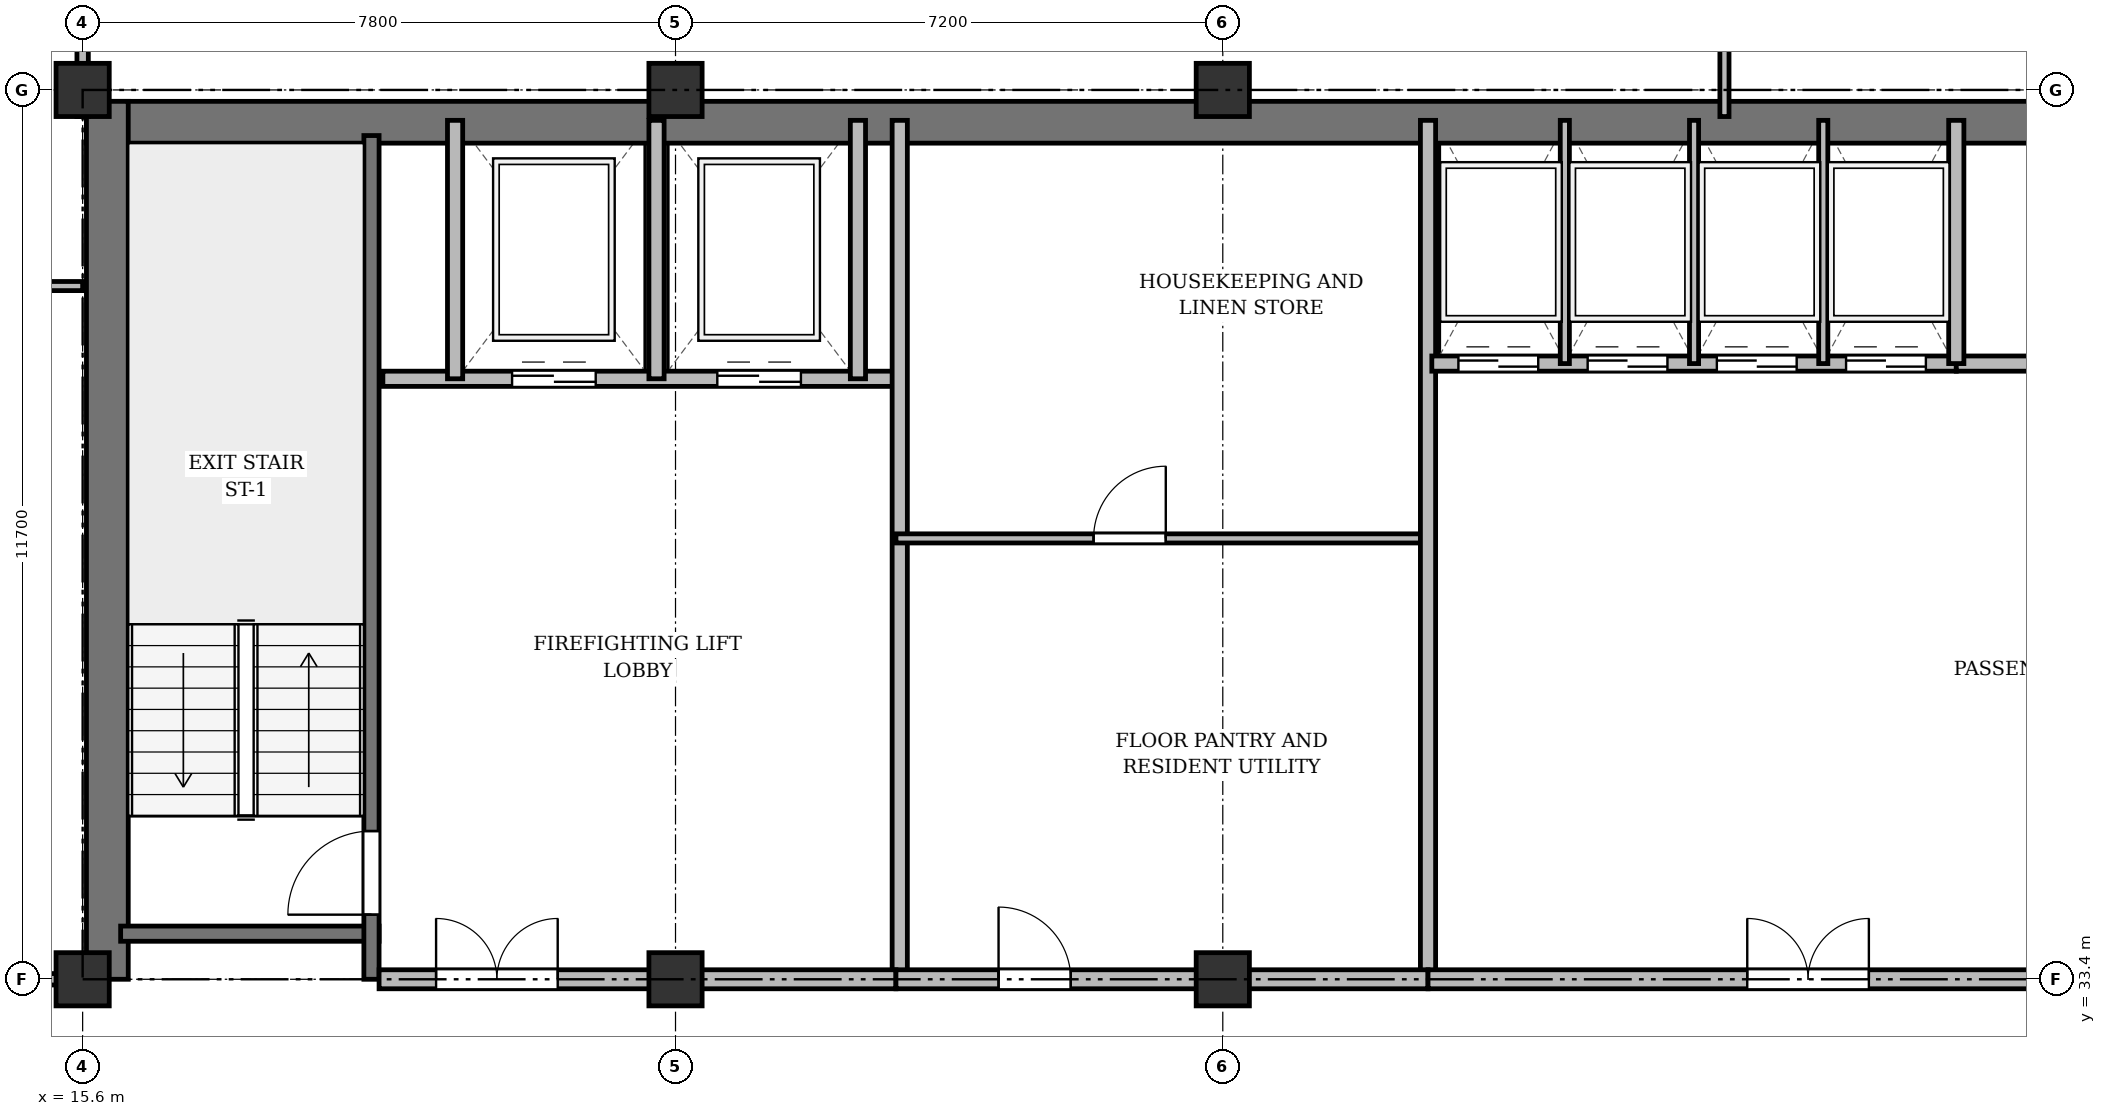
"""IFC4 building model, lengths in metres.
Left out: names, types, materials, properties, quantities, classifications, styles, units other than length and angle.
Written with IfcOpenShell. Run it as: python <this file> out.ifc"""

import sys

from ifc_helpers import new_model, si_unit, direction, frame, frame_2d, origin, origin_2d, place, context, subcontext, project, spatial, rectangle, extrude, source, transform, mapped, element, fill, save


model = new_model("IFC4")
c1 = context("Model", 3, precision=1e-05, world=origin(), true_north=direction((0.0, 1.0)))
c2 = subcontext(c1, "Body", "Model", "MODEL_VIEW")
j1 = project(units=[si_unit("LENGTHUNIT", "METRE"), si_unit("PLANEANGLEUNIT", "RADIAN")], contexts=[c1])
p1 = place(None, origin())
s1 = spatial("IfcSite", under=j1, at=p1, CompositionType="ELEMENT")
p2 = place(p1, origin())
s2 = spatial("IfcBuilding", under=s1, at=p2, CompositionType="ELEMENT")
p3 = place(p2, frame((0.0, 0.0, 175.3)))
s3 = spatial("IfcBuildingStorey", under=s2, at=p3, CompositionType="ELEMENT", Elevation=175.3)
m1 = source(origin(), c2, "Body", "SweptSolid", [
    extrude(rectangle(XDim=0.7, YDim=0.7, at=origin_2d()), origin(), (0.0, 0.0, 1.0), 3.6),
])
for number, where, z_axis, x_axis in (
    (1, (15.6, 33.4, 0.0), (0.0, 0.0, 1.0), (1.0, 0.0, 0.0)),
    (2, (15.6, 45.1, 0.0), (0.0, 0.0, 1.0), (1.0, 0.0, 0.0)),
    (3, (23.4, 33.4, 0.0), (0.0, 0.0, 1.0), (1.0, 0.0, 0.0)),
    (4, (23.4, 45.1, 0.0), (0.0, 0.0, 1.0), (1.0, 0.0, 0.0)),
    (5, (30.6, 33.4, 0.0), (0.0, 0.0, 1.0), (1.0, 0.0, 0.0)),
    (6, (30.6, 45.1, 0.0), (0.0, 0.0, 1.0), (1.0, 0.0, 0.0)),
):
    element("IfcColumn", number, at=place(p3, frame(where, z_axis=z_axis, x_axis=x_axis)), inside=s3, PredefinedType="COLUMN", context=c2, shape_type="MappedRepresentation", body=[
        mapped(m1, transform((0.0, 0.0, 0.0), x_axis=(1.0, 0.0, 0.0), y_axis=(0.0, 1.0, 0.0), z_axis=(0.0, 0.0, 1.0), scale=1.0)),
    ])
p4 = place(p3, frame((15.65, 44.675, 0.0), z_axis=(0.0, 0.0, 1.0), x_axis=(1.0, 0.0, 0.0)))
e7 = element("IfcWall", 7, at=p4, inside=s3, PredefinedType="SHEAR", context=c2, shape_type="SweptSolid", body=[
    extrude(rectangle(XDim=43.1, YDim=0.55, at=frame_2d((21.55, 0.0))), origin(), (0.0, 0.0, 1.0), 3.35),
])
p5 = place(p3, frame((15.925, 33.4, 0.0), z_axis=(0.0, 0.0, 1.0), x_axis=(0.0, 1.0, 0.0)))
e8 = element("IfcWall", 8, at=p5, inside=s3, PredefinedType="SHEAR", context=c2, shape_type="SweptSolid", body=[
    extrude(rectangle(XDim=11.55, YDim=0.55, at=frame_2d((5.775, 0.0))), origin(), (0.0, 0.0, 1.0), 3.35),
])
p6 = place(p3, frame((16.1, 34.0, 0.0), z_axis=(0.0, 0.0, 1.0), x_axis=(1.0, 0.0, 0.0)))
e9 = element("IfcWall", 9, at=p6, inside=s3, PredefinedType="SHEAR", context=c2, shape_type="SweptSolid", body=[
    extrude(rectangle(XDim=3.4, YDim=0.2, at=frame_2d((1.7, 0.0))), origin(), (0.0, 0.0, 1.0), 3.35),
])
p7 = place(p3, frame((19.4, 33.4, 0.0), z_axis=(0.0, 0.0, 1.0), x_axis=(0.0, 1.0, 0.0)))
e10 = element("IfcWall", 10, at=p7, inside=s3, PredefinedType="SHEAR", context=c2, shape_type="SweptSolid", body=[
    extrude(rectangle(XDim=11.1, YDim=0.2, at=frame_2d((5.55, 0.0))), origin(), (0.0, 0.0, 1.0), 3.35),
])
p8 = place(p7, frame((0.85, 0.0, 0.0)))
e11 = element("IfcOpeningElement", 11, at=p8, cuts=e10, PredefinedType="OPENING", context=c2, shape_type="SweptSolid", body=[
    extrude(rectangle(XDim=1.1, YDim=2.15, at=frame_2d((0.55, 1.075))), frame((0.0, 0.11, 0.0), z_axis=(0.0, -1.0, 0.0), x_axis=(1.0, 0.0, 0.0)), (0.0, 0.0, 1.0), 0.22),
])
p9 = place(p3, frame((19.55, 41.3, 0.0), z_axis=(0.0, 0.0, 1.0), x_axis=(1.0, 0.0, 0.0)))
e12 = element("IfcWall", 12, at=p9, inside=s3, PredefinedType="SOLIDWALL", context=c2, shape_type="SweptSolid", body=[
    extrude(rectangle(XDim=6.75, YDim=0.2, at=frame_2d((3.375, 0.0))), origin(), (0.0, 0.0, 1.0), 3.35),
])
p10 = place(p9, frame((1.7, 0.0, 0.0)))
e13 = element("IfcOpeningElement", 13, at=p10, cuts=e12, PredefinedType="OPENING", context=c2, shape_type="SweptSolid", body=[
    extrude(rectangle(XDim=1.1, YDim=2.15, at=frame_2d((0.55, 1.075))), frame((0.0, 0.11, 0.0), z_axis=(0.0, -1.0, 0.0), x_axis=(1.0, 0.0, 0.0)), (0.0, 0.0, 1.0), 0.22),
])
p11 = place(p9, frame((4.4, 0.0, 0.0)))
e14 = element("IfcOpeningElement", 14, at=p11, cuts=e12, PredefinedType="OPENING", context=c2, shape_type="SweptSolid", body=[
    extrude(rectangle(XDim=1.1, YDim=2.15, at=frame_2d((0.55, 1.075))), frame((0.0, 0.11, 0.0), z_axis=(0.0, -1.0, 0.0), x_axis=(1.0, 0.0, 0.0)), (0.0, 0.0, 1.0), 0.22),
])
for number, where, z_axis, x_axis in (
    (15, (20.5, 41.3, 0.0), (0.0, 0.0, 1.0), (0.0, 1.0, 0.0)),
    (16, (23.15, 41.3, 0.0), (0.0, 0.0, 1.0), (0.0, 1.0, 0.0)),
    (17, (25.8, 41.3, 0.0), (0.0, 0.0, 1.0), (0.0, 1.0, 0.0)),
):
    element("IfcWall", number, at=place(p3, frame(where, z_axis=z_axis, x_axis=x_axis)), inside=s3, PredefinedType="SOLIDWALL", context=c2, shape_type="SweptSolid", body=[
        extrude(rectangle(XDim=3.4, YDim=0.2, at=frame_2d((1.7, 0.0))), origin(), (0.0, 0.0, 1.0), 3.35),
    ])
p12 = place(p3, frame((26.35, 33.4, 0.0), z_axis=(0.0, 0.0, 1.0), x_axis=(0.0, 1.0, 0.0)))
e18 = element("IfcWall", 18, at=p12, inside=s3, PredefinedType="SOLIDWALL", context=c2, shape_type="SweptSolid", body=[
    extrude(rectangle(XDim=11.3, YDim=0.2, at=frame_2d((5.65, 0.0))), origin(), (0.0, 0.0, 1.0), 2.75),
])
p13 = place(p3, frame((19.5, 33.4, 0.0), z_axis=(0.0, 0.0, 1.0), x_axis=(1.0, 0.0, 0.0)))
e19 = element("IfcWall", 19, at=p13, inside=s3, PredefinedType="PARTITIONING", context=c2, shape_type="SweptSolid", body=[
    extrude(rectangle(XDim=6.8, YDim=0.25, at=frame_2d((3.4, 0.0))), origin(), (0.0, 0.0, 1.0), 2.75),
])
p14 = place(p13, frame((0.75, 0.0, 0.0)))
e20 = element("IfcOpeningElement", 20, at=p14, cuts=e19, PredefinedType="OPENING", context=c2, shape_type="SweptSolid", body=[
    extrude(rectangle(XDim=1.6, YDim=2.2, at=frame_2d((0.8, 1.1))), frame((0.0, 0.135, 0.0), z_axis=(0.0, -1.0, 0.0), x_axis=(1.0, 0.0, 0.0)), (0.0, 0.0, 1.0), 0.27),
])
p15 = place(p3, frame((26.3, 39.2, 0.0), z_axis=(0.0, 0.0, 1.0), x_axis=(1.0, 0.0, 0.0)))
e21 = element("IfcWall", 21, at=p15, inside=s3, PredefinedType="PARTITIONING", context=c2, shape_type="SweptSolid", body=[
    extrude(rectangle(XDim=7.0, YDim=0.12, at=frame_2d((3.5, 0.0))), origin(), (0.0, 0.0, 1.0), 2.85),
])
p16 = place(p15, frame((2.6, 0.0, 0.0)))
e22 = element("IfcOpeningElement", 22, at=p16, cuts=e21, PredefinedType="OPENING", context=c2, shape_type="SweptSolid", body=[
    extrude(rectangle(XDim=0.95, YDim=2.15, at=frame_2d((0.475, 1.075))), frame((0.0, 0.07, 0.0), z_axis=(0.0, -1.0, 0.0), x_axis=(1.0, 0.0, 0.0)), (0.0, 0.0, 1.0), 0.14),
])
p17 = place(p3, frame((33.3, 33.4, 0.0), z_axis=(0.0, 0.0, 1.0), x_axis=(0.0, 1.0, 0.0)))
e23 = element("IfcWall", 23, at=p17, inside=s3, PredefinedType="SOLIDWALL", context=c2, shape_type="SweptSolid", body=[
    extrude(rectangle(XDim=11.3, YDim=0.2, at=frame_2d((5.65, 0.0))), origin(), (0.0, 0.0, 1.0), 2.75),
])
p18 = place(p3, frame((33.35, 41.5, 0.0), z_axis=(0.0, 0.0, 1.0), x_axis=(1.0, 0.0, 0.0)))
e24 = element("IfcWall", 24, at=p18, inside=s3, PredefinedType="SOLIDWALL", context=c2, shape_type="SweptSolid", body=[
    extrude(rectangle(XDim=6.9, YDim=0.2, at=frame_2d((3.45, 0.0))), origin(), (0.0, 0.0, 1.0), 3.35),
])
p19 = place(p18, frame((0.35, 0.0, 0.0)))
e25 = element("IfcOpeningElement", 25, at=p19, cuts=e24, PredefinedType="OPENING", context=c2, shape_type="SweptSolid", body=[
    extrude(rectangle(XDim=1.05, YDim=2.15, at=frame_2d((0.525, 1.075))), frame((0.0, 0.11, 0.0), z_axis=(0.0, -1.0, 0.0), x_axis=(1.0, 0.0, 0.0)), (0.0, 0.0, 1.0), 0.22),
])
p20 = place(p18, frame((2.05, 0.0, 0.0)))
e26 = element("IfcOpeningElement", 26, at=p20, cuts=e24, PredefinedType="OPENING", context=c2, shape_type="SweptSolid", body=[
    extrude(rectangle(XDim=1.05, YDim=2.15, at=frame_2d((0.525, 1.075))), frame((0.0, 0.11, 0.0), z_axis=(0.0, -1.0, 0.0), x_axis=(1.0, 0.0, 0.0)), (0.0, 0.0, 1.0), 0.22),
])
p21 = place(p18, frame((3.75, 0.0, 0.0)))
e27 = element("IfcOpeningElement", 27, at=p21, cuts=e24, PredefinedType="OPENING", context=c2, shape_type="SweptSolid", body=[
    extrude(rectangle(XDim=1.05, YDim=2.15, at=frame_2d((0.525, 1.075))), frame((0.0, 0.11, 0.0), z_axis=(0.0, -1.0, 0.0), x_axis=(1.0, 0.0, 0.0)), (0.0, 0.0, 1.0), 0.22),
])
p22 = place(p18, frame((5.45, 0.0, 0.0)))
e28 = element("IfcOpeningElement", 28, at=p22, cuts=e24, PredefinedType="OPENING", context=c2, shape_type="SweptSolid", body=[
    extrude(rectangle(XDim=1.05, YDim=2.15, at=frame_2d((0.525, 1.075))), frame((0.0, 0.11, 0.0), z_axis=(0.0, -1.0, 0.0), x_axis=(1.0, 0.0, 0.0)), (0.0, 0.0, 1.0), 0.22),
])
for number, where, z_axis, x_axis in (
    (29, (35.1, 41.5, 0.0), (0.0, 0.0, 1.0), (0.0, 1.0, 0.0)),
    (30, (36.8, 41.5, 0.0), (0.0, 0.0, 1.0), (0.0, 1.0, 0.0)),
    (31, (38.5, 41.5, 0.0), (0.0, 0.0, 1.0), (0.0, 1.0, 0.0)),
):
    element("IfcWall", number, at=place(p3, frame(where, z_axis=z_axis, x_axis=x_axis)), inside=s3, PredefinedType="PARTITIONING", context=c2, shape_type="SweptSolid", body=[
        extrude(rectangle(XDim=3.2, YDim=0.12, at=frame_2d((1.6, 0.0))), origin(), (0.0, 0.0, 1.0), 3.35),
    ])
p23 = place(p3, frame((40.25, 41.5, 0.0), z_axis=(0.0, 0.0, 1.0), x_axis=(1.0, 0.0, 0.0)))
e32 = element("IfcWall", 32, at=p23, inside=s3, PredefinedType="SOLIDWALL", context=c2, shape_type="SweptSolid", body=[
    extrude(rectangle(XDim=6.9, YDim=0.2, at=frame_2d((3.45, 0.0))), origin(), (0.0, 0.0, 1.0), 2.85),
])
p24 = place(p3, frame((40.25, 41.5, 0.0), z_axis=(0.0, 0.0, 1.0), x_axis=(0.0, 1.0, 0.0)))
e33 = element("IfcWall", 33, at=p24, inside=s3, PredefinedType="SOLIDWALL", context=c2, shape_type="SweptSolid", body=[
    extrude(rectangle(XDim=3.2, YDim=0.2, at=frame_2d((1.6, 0.0))), origin(), (0.0, 0.0, 1.0), 3.35),
])
p25 = place(p3, frame((26.3, 33.4, 0.0), z_axis=(0.0, 0.0, 1.0), x_axis=(1.0, 0.0, 0.0)))
e34 = element("IfcWall", 34, at=p25, inside=s3, PredefinedType="PARTITIONING", context=c2, shape_type="SweptSolid", body=[
    extrude(rectangle(XDim=7.0, YDim=0.25, at=frame_2d((3.5, 0.0))), origin(), (0.0, 0.0, 1.0), 2.75),
])
p26 = place(p25, frame((1.35, 0.0, 0.0)))
e35 = element("IfcOpeningElement", 35, at=p26, cuts=e34, PredefinedType="OPENING", context=c2, shape_type="SweptSolid", body=[
    extrude(rectangle(XDim=0.95, YDim=2.15, at=frame_2d((0.475, 1.075))), frame((0.0, 0.135, 0.0), z_axis=(0.0, -1.0, 0.0), x_axis=(1.0, 0.0, 0.0)), (0.0, 0.0, 1.0), 0.27),
])
p27 = place(p3, frame((33.3, 33.4, 0.0), z_axis=(0.0, 0.0, 1.0), x_axis=(1.0, 0.0, 0.0)))
e36 = element("IfcWall", 36, at=p27, inside=s3, PredefinedType="PARTITIONING", context=c2, shape_type="SweptSolid", body=[
    extrude(rectangle(XDim=13.85, YDim=0.25, at=frame_2d((6.925, 0.0))), origin(), (0.0, 0.0, 1.0), 2.75),
])
p28 = place(p27, frame((4.2, 0.0, 0.0)))
e37 = element("IfcOpeningElement", 37, at=p28, cuts=e36, PredefinedType="OPENING", context=c2, shape_type="SweptSolid", body=[
    extrude(rectangle(XDim=1.6, YDim=2.2, at=frame_2d((0.8, 1.1))), frame((0.0, 0.135, 0.0), z_axis=(0.0, -1.0, 0.0), x_axis=(1.0, 0.0, 0.0)), (0.0, 0.0, 1.0), 0.27),
])
p29 = place(p3, frame((11.825, 42.52, 0.0), z_axis=(0.0, 0.0, 1.0), x_axis=(1.0, 0.0, 0.0)))
e38 = element("IfcWall", 38, at=p29, inside=s3, PredefinedType="PARTITIONING", context=c2, shape_type="SweptSolid", body=[
    extrude(rectangle(XDim=3.775, YDim=0.12, at=frame_2d((1.888, 0.0))), origin(), (0.0, 0.0, 1.0), 2.85),
])
p30 = place(p29, frame((1.319, 0.0, 0.0)))
e39 = element("IfcOpeningElement", 39, at=p30, cuts=e38, PredefinedType="OPENING", context=c2, shape_type="SweptSolid", body=[
    extrude(rectangle(XDim=0.95, YDim=2.15, at=frame_2d((0.475, 1.075))), frame((0.0, 0.07, 0.0), z_axis=(0.0, -1.0, 0.0), x_axis=(1.0, 0.0, 0.0)), (0.0, 0.0, 1.0), 0.14),
])
p31 = place(p3, frame((8.05, 33.4, 0.0), z_axis=(0.0, 0.0, 1.0), x_axis=(1.0, 0.0, 0.0)))
e40 = element("IfcWall", 40, at=p31, inside=s3, PredefinedType="PARTITIONING", context=c2, shape_type="SweptSolid", body=[
    extrude(rectangle(XDim=7.55, YDim=0.15, at=frame_2d((3.775, 0.0))), origin(), (0.0, 0.0, 1.0), 2.75),
])
p32 = place(p31, frame((4.375, 0.0, 0.0)))
e41 = element("IfcOpeningElement", 41, at=p32, cuts=e40, PredefinedType="OPENING", context=c2, shape_type="SweptSolid", body=[
    extrude(rectangle(XDim=0.95, YDim=2.15, at=frame_2d((0.475, 1.075))), frame((0.0, 0.085, 0.0), z_axis=(0.0, -1.0, 0.0), x_axis=(1.0, 0.0, 0.0)), (0.0, 0.0, 1.0), 0.17),
])
p33 = place(p3, frame((37.2, 44.75, 0.0), z_axis=(0.0, 0.0, 1.0), x_axis=(0.0, 1.0, 0.0)))
e42 = element("IfcWall", 42, at=p33, inside=s3, PredefinedType="PARTITIONING", context=c2, shape_type="SweptSolid", body=[
    extrude(rectangle(XDim=3.61, YDim=0.12, at=frame_2d((1.805, 0.0))), origin(), (0.0, 0.0, 1.0), 2.75),
])
p34 = place(p33, frame((1.1, 0.0, 0.0)))
e43 = element("IfcOpeningElement", 43, at=p34, cuts=e42, PredefinedType="OPENING", context=c2, shape_type="SweptSolid", body=[
    extrude(rectangle(XDim=0.95, YDim=2.15, at=frame_2d((0.475, 1.075))), frame((0.0, 0.07, 0.0), z_axis=(0.0, -1.0, 0.0), x_axis=(1.0, 0.0, 0.0)), (0.0, 0.0, 1.0), 0.14),
])
p35 = place(p3, frame((15.6, 44.75, 0.0), z_axis=(0.0, 0.0, 1.0), x_axis=(0.0, 1.0, 0.0)))
e44 = element("IfcWall", 44, at=p35, inside=s3, PredefinedType="PARTITIONING", context=c2, shape_type="SweptSolid", body=[
    extrude(rectangle(XDim=3.61, YDim=0.15, at=frame_2d((1.805, 0.0))), origin(), (0.0, 0.0, 1.0), 2.85),
])
p36 = place(p35, frame((1.1, 0.0, 0.0)))
e45 = element("IfcOpeningElement", 45, at=p36, cuts=e44, PredefinedType="OPENING", context=c2, shape_type="SweptSolid", body=[
    extrude(rectangle(XDim=0.95, YDim=2.15, at=frame_2d((0.475, 1.075))), frame((0.0, 0.085, 0.0), z_axis=(0.0, -1.0, 0.0), x_axis=(1.0, 0.0, 0.0)), (0.0, 0.0, 1.0), 0.17),
])
m2 = source(origin(), c2, "Body", "SweptSolid", [
    extrude(rectangle(XDim=1.1, YDim=2.15, at=frame_2d((0.55, 1.075))), frame((0.0, 0.025, 0.0), z_axis=(0.0, -1.0, 0.0), x_axis=(1.0, 0.0, 0.0)), (0.0, 0.0, 1.0), 0.05),
])
p37 = place(p8, origin())
e46 = element("IfcDoor", 46, at=p37, inside=s3, OperationType="SINGLE_SWING_LEFT", PredefinedType="DOOR", context=c2, shape_type="MappedRepresentation", body=[
    mapped(m2, transform((0.0, 0.0, 0.0), x_axis=(1.0, 0.0, 0.0), y_axis=(0.0, 1.0, 0.0), z_axis=(0.0, 0.0, 1.0), scale=1.0)),
])
fill(e11, e46)
p38 = place(p10, origin())
e47 = element("IfcDoor", 47, at=p38, inside=s3, OperationType="DOUBLE_DOOR_SLIDING", PredefinedType="DOOR", context=c2, shape_type="MappedRepresentation", body=[
    mapped(m2, transform((0.0, 0.0, 0.0), x_axis=(1.0, 0.0, 0.0), y_axis=(0.0, 1.0, 0.0), z_axis=(0.0, 0.0, 1.0), scale=1.0)),
])
fill(e13, e47)
p39 = place(p11, origin())
e48 = element("IfcDoor", 48, at=p39, inside=s3, OperationType="DOUBLE_DOOR_SLIDING", PredefinedType="DOOR", context=c2, shape_type="MappedRepresentation", body=[
    mapped(m2, transform((0.0, 0.0, 0.0), x_axis=(1.0, 0.0, 0.0), y_axis=(0.0, 1.0, 0.0), z_axis=(0.0, 0.0, 1.0), scale=1.0)),
])
fill(e14, e48)
m3 = source(origin(), c2, "Body", "SweptSolid", [
    extrude(rectangle(XDim=1.6, YDim=2.2, at=frame_2d((0.8, 1.1))), frame((0.0, 0.025, 0.0), z_axis=(0.0, -1.0, 0.0), x_axis=(1.0, 0.0, 0.0)), (0.0, 0.0, 1.0), 0.05),
])
p40 = place(p14, origin())
e49 = element("IfcDoor", 49, at=p40, inside=s3, OperationType="DOUBLE_DOOR_SINGLE_SWING", PredefinedType="DOOR", context=c2, shape_type="MappedRepresentation", body=[
    mapped(m3, transform((0.0, 0.0, 0.0), x_axis=(1.0, 0.0, 0.0), y_axis=(0.0, 1.0, 0.0), z_axis=(0.0, 0.0, 1.0), scale=1.0)),
])
fill(e20, e49)
m4 = source(origin(), c2, "Body", "SweptSolid", [
    extrude(rectangle(XDim=0.95, YDim=2.15, at=frame_2d((0.475, 1.075))), frame((0.0, 0.025, 0.0), z_axis=(0.0, -1.0, 0.0), x_axis=(1.0, 0.0, 0.0)), (0.0, 0.0, 1.0), 0.05),
])
p41 = place(p16, origin())
e50 = element("IfcDoor", 50, at=p41, inside=s3, OperationType="SINGLE_SWING_RIGHT", PredefinedType="DOOR", context=c2, shape_type="MappedRepresentation", body=[
    mapped(m4, transform((0.0, 0.0, 0.0), x_axis=(1.0, 0.0, 0.0), y_axis=(0.0, 1.0, 0.0), z_axis=(0.0, 0.0, 1.0), scale=1.0)),
])
fill(e22, e50)
m5 = source(origin(), c2, "Body", "SweptSolid", [
    extrude(rectangle(XDim=1.05, YDim=2.15, at=frame_2d((0.525, 1.075))), frame((0.0, 0.025, 0.0), z_axis=(0.0, -1.0, 0.0), x_axis=(1.0, 0.0, 0.0)), (0.0, 0.0, 1.0), 0.05),
])
p42 = place(p19, origin())
e51 = element("IfcDoor", 51, at=p42, inside=s3, OperationType="DOUBLE_DOOR_SLIDING", PredefinedType="DOOR", context=c2, shape_type="MappedRepresentation", body=[
    mapped(m5, transform((0.0, 0.0, 0.0), x_axis=(1.0, 0.0, 0.0), y_axis=(0.0, 1.0, 0.0), z_axis=(0.0, 0.0, 1.0), scale=1.0)),
])
fill(e25, e51)
p43 = place(p20, origin())
e52 = element("IfcDoor", 52, at=p43, inside=s3, OperationType="DOUBLE_DOOR_SLIDING", PredefinedType="DOOR", context=c2, shape_type="MappedRepresentation", body=[
    mapped(m5, transform((0.0, 0.0, 0.0), x_axis=(1.0, 0.0, 0.0), y_axis=(0.0, 1.0, 0.0), z_axis=(0.0, 0.0, 1.0), scale=1.0)),
])
fill(e26, e52)
p44 = place(p21, origin())
e53 = element("IfcDoor", 53, at=p44, inside=s3, OperationType="DOUBLE_DOOR_SLIDING", PredefinedType="DOOR", context=c2, shape_type="MappedRepresentation", body=[
    mapped(m5, transform((0.0, 0.0, 0.0), x_axis=(1.0, 0.0, 0.0), y_axis=(0.0, 1.0, 0.0), z_axis=(0.0, 0.0, 1.0), scale=1.0)),
])
fill(e27, e53)
p45 = place(p22, origin())
e54 = element("IfcDoor", 54, at=p45, inside=s3, OperationType="DOUBLE_DOOR_SLIDING", PredefinedType="DOOR", context=c2, shape_type="MappedRepresentation", body=[
    mapped(m5, transform((0.0, 0.0, 0.0), x_axis=(1.0, 0.0, 0.0), y_axis=(0.0, 1.0, 0.0), z_axis=(0.0, 0.0, 1.0), scale=1.0)),
])
fill(e28, e54)
p46 = place(p26, origin())
e55 = element("IfcDoor", 55, at=p46, inside=s3, OperationType="SINGLE_SWING_LEFT", PredefinedType="DOOR", context=c2, shape_type="MappedRepresentation", body=[
    mapped(m4, transform((0.0, 0.0, 0.0), x_axis=(1.0, 0.0, 0.0), y_axis=(0.0, 1.0, 0.0), z_axis=(0.0, 0.0, 1.0), scale=1.0)),
])
fill(e35, e55)
p47 = place(p28, origin())
e56 = element("IfcDoor", 56, at=p47, inside=s3, OperationType="DOUBLE_DOOR_SINGLE_SWING", PredefinedType="DOOR", context=c2, shape_type="MappedRepresentation", body=[
    mapped(m3, transform((0.0, 0.0, 0.0), x_axis=(1.0, 0.0, 0.0), y_axis=(0.0, 1.0, 0.0), z_axis=(0.0, 0.0, 1.0), scale=1.0)),
])
fill(e37, e56)
save(model, sys.argv[1])
